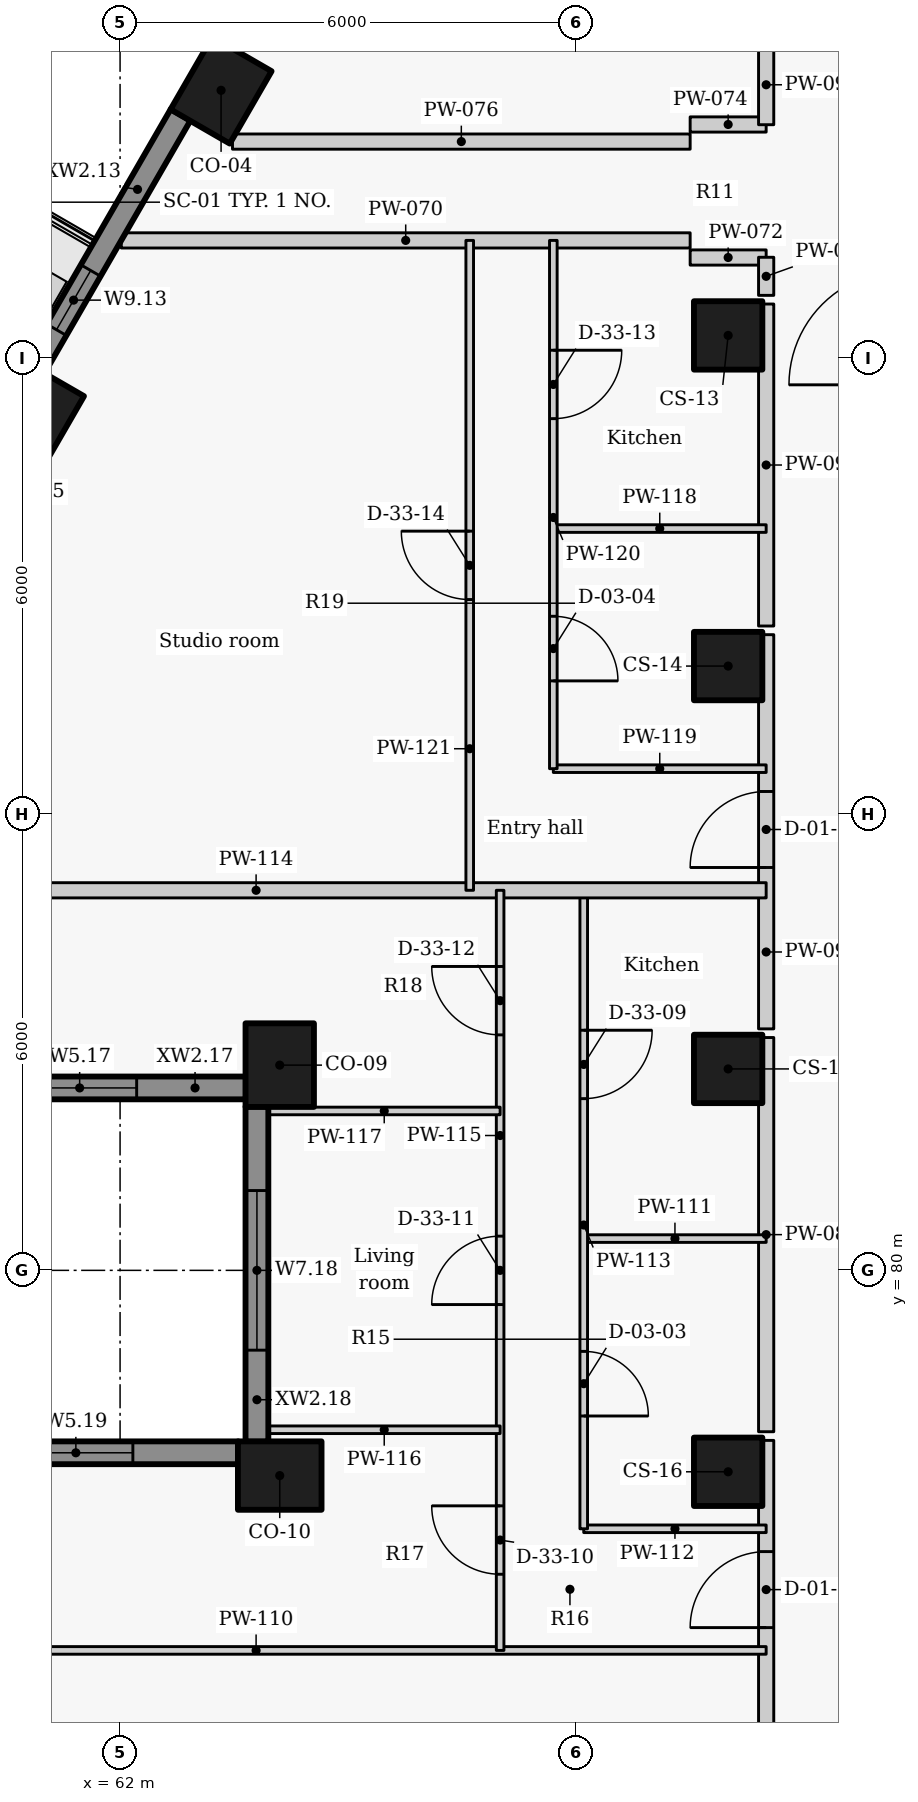
"""IFC4 building model, lengths in metres.
Left out: names, types, materials, properties, quantities, classifications, styles, units other than length and angle.
Written with IfcOpenShell. Run it as: python <this file> out.ifc"""

import sys

from ifc_helpers import new_model, si_unit, direction, frame, frame_2d, origin, origin_2d, place, context, subcontext, project, spatial, rectangle, extrude, element, fill, save


model = new_model("IFC4")
c1 = context("Model", 3, precision=1e-05, world=origin(), true_north=direction((0.0, 1.0)))
c2 = subcontext(c1, "Body", "Model", "MODEL_VIEW")
j1 = project(units=[si_unit("LENGTHUNIT", "METRE"), si_unit("PLANEANGLEUNIT", "RADIAN")], contexts=[c1])
p1 = place(None, origin())
s1 = spatial("IfcSite", under=j1, at=p1, CompositionType="ELEMENT")
p2 = place(p1, origin())
s2 = spatial("IfcBuilding", under=s1, at=p2, CompositionType="ELEMENT")
p3 = place(p2, frame((0.0, 0.0, 269.1)))
s3 = spatial("IfcBuildingStorey", under=s2, at=p3, CompositionType="ELEMENT", Elevation=269.1)
for number, where, z_axis, x_axis in (
    (1, (63.329, 95.525, 0.0), (0.0, 0.0, 1.0), (-0.5, -0.866, 0.0)),
    (2, (60.861, 91.25, 0.0), (0.0, 0.0, 1.0), (-0.5, -0.866, 0.0)),
    (3, (64.101, 82.7, 0.0), (0.0, 0.0, 1.0), (0.0, -1.0, 0.0)),
    (4, (64.101, 77.3, 0.0), (0.0, 0.0, 1.0), (-1.0, 0.0, 0.0)),
):
    element("IfcColumn", number, at=place(p3, frame(where, z_axis=z_axis, x_axis=x_axis)), inside=s3, PredefinedType="COLUMN", context=c2, shape_type="SweptSolid", body=[
        extrude(rectangle(XDim=1.1, YDim=0.9, at=origin_2d()), origin(), (0.0, 0.0, 1.0), 3.3),
    ])
for number, where, z_axis, x_axis in (
    (5, (70.0, 92.3, 0.0), (0.0, 0.0, 1.0), (0.0, -1.0, 0.0)),
    (6, (70.0, 87.95, 0.0), (0.0, 0.0, 1.0), (0.0, -1.0, 0.0)),
    (7, (70.0, 82.65, 0.0), (0.0, 0.0, 1.0), (0.0, -1.0, 0.0)),
    (8, (70.0, 77.35, 0.0), (0.0, 0.0, 1.0), (0.0, -1.0, 0.0)),
):
    element("IfcColumn", number, at=place(p3, frame(where, z_axis=z_axis, x_axis=x_axis)), inside=s3, PredefinedType="COLUMN", context=c2, shape_type="SweptSolid", body=[
        extrude(rectangle(XDim=0.9, YDim=0.9, at=origin_2d()), origin(), (0.0, 0.0, 1.0), 3.3),
    ])
p4 = place(p3, frame((62.796, 95.202, 0.0), z_axis=(0.0, 0.0, 1.0), x_axis=(-0.499984490703, -0.866034357896, 0.0)))
e9 = element("IfcWall", 9, at=p4, inside=s3, PredefinedType="SOLIDWALL", context=c2, shape_type="SweptSolid", body=[
    extrude(rectangle(XDim=3.844, YDim=0.3, at=frame_2d((1.922, 0.0))), origin(), (0.0, 0.0, 1.0), 2.125),
])
p5 = place(p4, frame((2.365, 0.0, 0.9)))
e10 = element("IfcOpeningElement", 10, at=p5, cuts=e9, PredefinedType="OPENING", context=c2, shape_type="SweptSolid", body=[
    extrude(rectangle(XDim=0.9, YDim=1.1, at=frame_2d((0.45, 0.55))), frame((0.0, 0.16, 0.0), z_axis=(0.0, -1.0, 0.0), x_axis=(1.0, 0.0, 0.0)), (0.0, 0.0, 1.0), 0.32),
])
p6 = place(p3, frame((59.282, 82.4, 0.0), z_axis=(0.0, 0.0, 1.0), x_axis=(1.0, 0.0, 0.0)))
e11 = element("IfcWall", 11, at=p6, inside=s3, PredefinedType="SOLIDWALL", context=c2, shape_type="SweptSolid", body=[
    extrude(rectangle(XDim=4.373, YDim=0.3, at=frame_2d((2.186, 0.0))), origin(), (0.0, 0.0, 1.0), 2.125),
])
p7 = place(p6, frame((1.436, 0.0, 0.9)))
e12 = element("IfcOpeningElement", 12, at=p7, cuts=e11, PredefinedType="OPENING", context=c2, shape_type="SweptSolid", body=[
    extrude(rectangle(XDim=1.5, YDim=1.1, at=frame_2d((0.75, 0.55))), frame((0.0, 0.16, 0.0), z_axis=(0.0, -1.0, 0.0), x_axis=(1.0, 0.0, 0.0)), (0.0, 0.0, 1.0), 0.32),
])
p8 = place(p3, frame((63.801, 82.154, 0.0), z_axis=(0.0, 0.0, 1.0), x_axis=(0.0, -1.0, 0.0)))
e13 = element("IfcWall", 13, at=p8, inside=s3, PredefinedType="SOLIDWALL", context=c2, shape_type="SweptSolid", body=[
    extrude(rectangle(XDim=4.408, YDim=0.3, at=frame_2d((2.204, 0.0))), origin(), (0.0, 0.0, 1.0), 2.125),
])
p9 = place(p8, frame((1.104, 0.0, 0.9)))
e14 = element("IfcOpeningElement", 14, at=p9, cuts=e13, PredefinedType="OPENING", context=c2, shape_type="SweptSolid", body=[
    extrude(rectangle(XDim=2.1, YDim=1.1, at=frame_2d((1.05, 0.55))), frame((0.0, 0.16, 0.0), z_axis=(0.0, -1.0, 0.0), x_axis=(1.0, 0.0, 0.0)), (0.0, 0.0, 1.0), 0.32),
])
p10 = place(p3, frame((63.554, 77.6, 0.0), z_axis=(0.0, 0.0, 1.0), x_axis=(-1.0, 0.0, 0.0)))
e15 = element("IfcWall", 15, at=p10, inside=s3, PredefinedType="SOLIDWALL", context=c2, shape_type="SweptSolid", body=[
    extrude(rectangle(XDim=4.272, YDim=0.3, at=frame_2d((2.136, 0.0))), origin(), (0.0, 0.0, 1.0), 2.125),
])
p11 = place(p10, frame((1.386, 0.0, 0.9)))
e16 = element("IfcOpeningElement", 16, at=p11, cuts=e15, PredefinedType="OPENING", context=c2, shape_type="SweptSolid", body=[
    extrude(rectangle(XDim=1.5, YDim=1.1, at=frame_2d((0.75, 0.55))), frame((0.0, 0.16, 0.0), z_axis=(0.0, -1.0, 0.0), x_axis=(1.0, 0.0, 0.0)), (0.0, 0.0, 1.0), 0.32),
])
p12 = place(p3, frame((62.015, 93.55, 0.0), z_axis=(0.0, 0.0, 1.0), x_axis=(1.0, 0.0, 0.0)))
e17 = element("IfcWall", 17, at=p12, inside=s3, PredefinedType="PARTITIONING", context=c2, shape_type="SweptSolid", body=[
    extrude(rectangle(XDim=7.485, YDim=0.2, at=frame_2d((3.742, 0.0))), origin(), (0.0, 0.0, 1.0), 2.105),
])
for number, where, z_axis, x_axis in (
    (18, (69.5, 93.325, 0.0), (0.0, 0.0, 1.0), (1.0, 0.0, 0.0)),
    (19, (69.5, 95.075, 0.0), (0.0, 0.0, 1.0), (1.0, 0.0, 0.0)),
):
    element("IfcWall", number, at=place(p3, frame(where, z_axis=z_axis, x_axis=x_axis)), inside=s3, PredefinedType="PARTITIONING", context=c2, shape_type="SweptSolid", body=[
        extrude(rectangle(XDim=1.0, YDim=0.2, at=frame_2d((0.5, 0.0))), origin(), (0.0, 0.0, 1.0), 2.505),
    ])
p13 = place(p3, frame((63.479, 94.85, 0.0), z_axis=(0.0, 0.0, 1.0), x_axis=(1.0, 0.0, 0.0)))
e20 = element("IfcWall", 20, at=p13, inside=s3, PredefinedType="PARTITIONING", context=c2, shape_type="SweptSolid", body=[
    extrude(rectangle(XDim=6.021, YDim=0.2, at=frame_2d((3.01, 0.0))), origin(), (0.0, 0.0, 1.0), 3.025),
])
p14 = place(p3, frame((70.5, 72.577, 0.0), z_axis=(0.0, 0.0, 1.0), x_axis=(0.0, 1.0, 0.0)))
e21 = element("IfcWall", 21, at=p14, inside=s3, PredefinedType="PARTITIONING", context=c2, shape_type="SweptSolid", body=[
    extrude(rectangle(XDim=5.186, YDim=0.2, at=frame_2d((2.593, 0.0))), origin(), (0.0, 0.0, 1.0), 3.025),
])
p15 = place(p14, frame((2.723, 0.0, 0.0)))
e22 = element("IfcOpeningElement", 22, at=p15, cuts=e21, PredefinedType="OPENING", context=c2, shape_type="SweptSolid", body=[
    extrude(rectangle(XDim=1.0, YDim=2.1, at=frame_2d((0.5, 1.05))), frame((0.0, 0.11, 0.0), z_axis=(0.0, -1.0, 0.0), x_axis=(1.0, 0.0, 0.0)), (0.0, 0.0, 1.0), 0.22),
])
p16 = place(p3, frame((70.5, 77.877, 0.0), z_axis=(0.0, 0.0, 1.0), x_axis=(0.0, 1.0, 0.0)))
e23 = element("IfcWall", 23, at=p16, inside=s3, PredefinedType="PARTITIONING", context=c2, shape_type="SweptSolid", body=[
    extrude(rectangle(XDim=5.186, YDim=0.2, at=frame_2d((2.593, 0.0))), origin(), (0.0, 0.0, 1.0), 3.025),
])
p17 = place(p3, frame((70.5, 83.177, 0.0), z_axis=(0.0, 0.0, 1.0), x_axis=(0.0, 1.0, 0.0)))
e24 = element("IfcWall", 24, at=p17, inside=s3, PredefinedType="PARTITIONING", context=c2, shape_type="SweptSolid", body=[
    extrude(rectangle(XDim=5.186, YDim=0.2, at=frame_2d((2.593, 0.0))), origin(), (0.0, 0.0, 1.0), 3.025),
])
p18 = place(p17, frame((2.123, 0.0, 0.0)))
e25 = element("IfcOpeningElement", 25, at=p18, cuts=e24, PredefinedType="OPENING", context=c2, shape_type="SweptSolid", body=[
    extrude(rectangle(XDim=1.0, YDim=2.1, at=frame_2d((0.5, 1.05))), frame((0.0, 0.11, 0.0), z_axis=(0.0, -1.0, 0.0), x_axis=(1.0, 0.0, 0.0)), (0.0, 0.0, 1.0), 0.22),
])
p19 = place(p3, frame((70.5, 88.477, 0.0), z_axis=(0.0, 0.0, 1.0), x_axis=(0.0, 1.0, 0.0)))
e26 = element("IfcWall", 26, at=p19, inside=s3, PredefinedType="PARTITIONING", context=c2, shape_type="SweptSolid", body=[
    extrude(rectangle(XDim=4.236, YDim=0.2, at=frame_2d((2.118, 0.0))), origin(), (0.0, 0.0, 1.0), 3.025),
])
p20 = place(p3, frame((70.5, 92.827, 0.0), z_axis=(0.0, 0.0, 1.0), x_axis=(0.0, 1.0, 0.0)))
e27 = element("IfcWall", 27, at=p20, inside=s3, PredefinedType="PARTITIONING", context=c2, shape_type="SweptSolid", body=[
    extrude(rectangle(XDim=0.501, YDim=0.2, at=frame_2d((0.25, 0.0))), origin(), (0.0, 0.0, 1.0), 3.025),
])
p21 = place(p3, frame((70.5, 95.072, 0.0), z_axis=(0.0, 0.0, 1.0), x_axis=(0.0, 1.0, 0.0)))
e28 = element("IfcWall", 28, at=p21, inside=s3, PredefinedType="PARTITIONING", context=c2, shape_type="SweptSolid", body=[
    extrude(rectangle(XDim=1.051, YDim=0.2, at=frame_2d((0.525, 0.0))), origin(), (0.0, 0.0, 1.0), 3.025),
])
p22 = place(p3, frame((57.079, 75.0, 0.0), z_axis=(0.0, 0.0, 1.0), x_axis=(1.0, 0.0, 0.0)))
e29 = element("IfcWall", 29, at=p22, inside=s3, PredefinedType="PARTITIONING", context=c2, shape_type="SweptSolid", body=[
    extrude(rectangle(XDim=13.421, YDim=0.1, at=frame_2d((6.71, 0.0))), origin(), (0.0, 0.0, 1.0), 2.105),
])
for number, where, z_axis, x_axis in (
    (30, (68.1, 80.418, 0.0), (0.0, 0.0, 1.0), (1.0, 0.0, 0.0)),
    (31, (68.1, 76.6, 0.0), (0.0, 0.0, 1.0), (1.0, 0.0, 0.0)),
):
    element("IfcWall", number, at=place(p3, frame(where, z_axis=z_axis, x_axis=x_axis)), inside=s3, PredefinedType="PARTITIONING", context=c2, shape_type="SweptSolid", body=[
        extrude(rectangle(XDim=2.4, YDim=0.1, at=frame_2d((1.2, 0.0))), origin(), (0.0, 0.0, 1.0), 2.505),
    ])
p23 = place(p3, frame((68.1, 85.0, 0.0), z_axis=(0.0, 0.0, 1.0), x_axis=(0.0, -1.0, 0.0)))
e32 = element("IfcWall", 32, at=p23, inside=s3, PredefinedType="PARTITIONING", context=c2, shape_type="SweptSolid", body=[
    extrude(rectangle(XDim=8.4, YDim=0.1, at=frame_2d((4.2, 0.0))), origin(), (0.0, 0.0, 1.0), 3.025),
])
p24 = place(p23, frame((6.066, 0.0, 0.0)))
e33 = element("IfcOpeningElement", 33, at=p24, cuts=e32, PredefinedType="OPENING", context=c2, shape_type="SweptSolid", body=[
    extrude(rectangle(XDim=0.85, YDim=2.1, at=frame_2d((0.425, 1.05))), frame((0.0, 0.06, 0.0), z_axis=(0.0, -1.0, 0.0), x_axis=(1.0, 0.0, 0.0)), (0.0, 0.0, 1.0), 0.12),
])
p25 = place(p23, frame((1.841, 0.0, 0.0)))
e34 = element("IfcOpeningElement", 34, at=p25, cuts=e32, PredefinedType="OPENING", context=c2, shape_type="SweptSolid", body=[
    extrude(rectangle(XDim=0.9, YDim=2.1, at=frame_2d((0.45, 1.05))), frame((0.0, 0.06, 0.0), z_axis=(0.0, -1.0, 0.0), x_axis=(1.0, 0.0, 0.0)), (0.0, 0.0, 1.0), 0.12),
])
p26 = place(p3, frame((57.079, 85.0, 0.0), z_axis=(0.0, 0.0, 1.0), x_axis=(1.0, 0.0, 0.0)))
e35 = element("IfcWall", 35, at=p26, inside=s3, PredefinedType="PARTITIONING", context=c2, shape_type="SweptSolid", body=[
    extrude(rectangle(XDim=13.421, YDim=0.2, at=frame_2d((6.71, 0.0))), origin(), (0.0, 0.0, 1.0), 2.105),
])
p27 = place(p3, frame((67.0, 75.0, 0.0), z_axis=(0.0, 0.0, 1.0), x_axis=(0.0, 1.0, 0.0)))
e36 = element("IfcWall", 36, at=p27, inside=s3, PredefinedType="PARTITIONING", context=c2, shape_type="SweptSolid", body=[
    extrude(rectangle(XDim=10.0, YDim=0.1, at=frame_2d((5.0, 0.0))), origin(), (0.0, 0.0, 1.0), 3.025),
])
p28 = place(p27, frame((1.002, 0.0, 0.0)))
e37 = element("IfcOpeningElement", 37, at=p28, cuts=e36, PredefinedType="OPENING", context=c2, shape_type="SweptSolid", body=[
    extrude(rectangle(XDim=0.9, YDim=2.1, at=frame_2d((0.45, 1.05))), frame((0.0, 0.06, 0.0), z_axis=(0.0, -1.0, 0.0), x_axis=(1.0, 0.0, 0.0)), (0.0, 0.0, 1.0), 0.12),
])
p29 = place(p27, frame((4.55, 0.0, 0.0)))
e38 = element("IfcOpeningElement", 38, at=p29, cuts=e36, PredefinedType="OPENING", context=c2, shape_type="SweptSolid", body=[
    extrude(rectangle(XDim=0.9, YDim=2.1, at=frame_2d((0.45, 1.05))), frame((0.0, 0.06, 0.0), z_axis=(0.0, -1.0, 0.0), x_axis=(1.0, 0.0, 0.0)), (0.0, 0.0, 1.0), 0.12),
])
p30 = place(p27, frame((8.098, 0.0, 0.0)))
e39 = element("IfcOpeningElement", 39, at=p30, cuts=e36, PredefinedType="OPENING", context=c2, shape_type="SweptSolid", body=[
    extrude(rectangle(XDim=0.9, YDim=2.1, at=frame_2d((0.45, 1.05))), frame((0.0, 0.06, 0.0), z_axis=(0.0, -1.0, 0.0), x_axis=(1.0, 0.0, 0.0)), (0.0, 0.0, 1.0), 0.12),
])
for number, where, z_axis, x_axis in (
    (40, (63.95, 77.903, 0.0), (0.0, 0.0, 1.0), (1.0, 0.0, 0.0)),
    (41, (63.95, 82.097, 0.0), (0.0, 0.0, 1.0), (1.0, 0.0, 0.0)),
):
    element("IfcWall", number, at=place(p3, frame(where, z_axis=z_axis, x_axis=x_axis)), inside=s3, PredefinedType="PARTITIONING", context=c2, shape_type="SweptSolid", body=[
        extrude(rectangle(XDim=3.05, YDim=0.1, at=frame_2d((1.525, 0.0))), origin(), (0.0, 0.0, 1.0), 2.105),
    ])
for number, where, z_axis, x_axis in (
    (42, (67.7, 89.759, 0.0), (0.0, 0.0, 1.0), (1.0, 0.0, 0.0)),
    (43, (67.7, 86.6, 0.0), (0.0, 0.0, 1.0), (1.0, 0.0, 0.0)),
):
    element("IfcWall", number, at=place(p3, frame(where, z_axis=z_axis, x_axis=x_axis)), inside=s3, PredefinedType="PARTITIONING", context=c2, shape_type="SweptSolid", body=[
        extrude(rectangle(XDim=2.8, YDim=0.1, at=frame_2d((1.4, 0.0))), origin(), (0.0, 0.0, 1.0), 2.505),
    ])
p31 = place(p3, frame((67.7, 93.55, 0.0), z_axis=(0.0, 0.0, 1.0), x_axis=(0.0, -1.0, 0.0)))
e44 = element("IfcWall", 44, at=p31, inside=s3, PredefinedType="PARTITIONING", context=c2, shape_type="SweptSolid", body=[
    extrude(rectangle(XDim=6.95, YDim=0.1, at=frame_2d((3.475, 0.0))), origin(), (0.0, 0.0, 1.0), 3.025),
])
p32 = place(p31, frame((4.945, 0.0, 0.0)))
e45 = element("IfcOpeningElement", 45, at=p32, cuts=e44, PredefinedType="OPENING", context=c2, shape_type="SweptSolid", body=[
    extrude(rectangle(XDim=0.85, YDim=2.1, at=frame_2d((0.425, 1.05))), frame((0.0, 0.06, 0.0), z_axis=(0.0, -1.0, 0.0), x_axis=(1.0, 0.0, 0.0)), (0.0, 0.0, 1.0), 0.12),
])
p33 = place(p31, frame((1.445, 0.0, 0.0)))
e46 = element("IfcOpeningElement", 46, at=p33, cuts=e44, PredefinedType="OPENING", context=c2, shape_type="SweptSolid", body=[
    extrude(rectangle(XDim=0.9, YDim=2.1, at=frame_2d((0.45, 1.05))), frame((0.0, 0.06, 0.0), z_axis=(0.0, -1.0, 0.0), x_axis=(1.0, 0.0, 0.0)), (0.0, 0.0, 1.0), 0.12),
])
p34 = place(p3, frame((66.6, 85.0, 0.0), z_axis=(0.0, 0.0, 1.0), x_axis=(0.0, 1.0, 0.0)))
e47 = element("IfcWall", 47, at=p34, inside=s3, PredefinedType="PARTITIONING", context=c2, shape_type="SweptSolid", body=[
    extrude(rectangle(XDim=8.55, YDim=0.1, at=frame_2d((4.275, 0.0))), origin(), (0.0, 0.0, 1.0), 3.025),
])
p35 = place(p34, frame((3.825, 0.0, 0.0)))
e48 = element("IfcOpeningElement", 48, at=p35, cuts=e47, PredefinedType="OPENING", context=c2, shape_type="SweptSolid", body=[
    extrude(rectangle(XDim=0.9, YDim=2.1, at=frame_2d((0.45, 1.05))), frame((0.0, 0.06, 0.0), z_axis=(0.0, -1.0, 0.0), x_axis=(1.0, 0.0, 0.0)), (0.0, 0.0, 1.0), 0.12),
])
p36 = place(p5, origin())
e49 = element("IfcWindow", 49, at=p36, inside=s3, PartitioningType="SINGLE_PANEL", PredefinedType="WINDOW", context=c2, shape_type="SweptSolid", body=[
    extrude(rectangle(XDim=0.9, YDim=1.1, at=frame_2d((0.45, 0.55))), frame((0.0, 0.03, 0.0), z_axis=(0.0, -1.0, 0.0), x_axis=(1.0, 0.0, 0.0)), (0.0, 0.0, 1.0), 0.06),
])
fill(e10, e49)
p37 = place(p7, origin())
e50 = element("IfcWindow", 50, at=p37, inside=s3, PartitioningType="SINGLE_PANEL", PredefinedType="WINDOW", context=c2, shape_type="SweptSolid", body=[
    extrude(rectangle(XDim=1.5, YDim=1.1, at=frame_2d((0.75, 0.55))), frame((0.0, 0.03, 0.0), z_axis=(0.0, -1.0, 0.0), x_axis=(1.0, 0.0, 0.0)), (0.0, 0.0, 1.0), 0.06),
])
fill(e12, e50)
p38 = place(p9, origin())
e51 = element("IfcWindow", 51, at=p38, inside=s3, PartitioningType="SINGLE_PANEL", PredefinedType="WINDOW", context=c2, shape_type="SweptSolid", body=[
    extrude(rectangle(XDim=2.1, YDim=1.1, at=frame_2d((1.05, 0.55))), frame((0.0, 0.03, 0.0), z_axis=(0.0, -1.0, 0.0), x_axis=(1.0, 0.0, 0.0)), (0.0, 0.0, 1.0), 0.06),
])
fill(e14, e51)
p39 = place(p11, origin())
e52 = element("IfcWindow", 52, at=p39, inside=s3, PartitioningType="SINGLE_PANEL", PredefinedType="WINDOW", context=c2, shape_type="SweptSolid", body=[
    extrude(rectangle(XDim=1.5, YDim=1.1, at=frame_2d((0.75, 0.55))), frame((0.0, 0.03, 0.0), z_axis=(0.0, -1.0, 0.0), x_axis=(1.0, 0.0, 0.0)), (0.0, 0.0, 1.0), 0.06),
])
fill(e16, e52)
p40 = place(p15, origin())
e53 = element("IfcDoor", 53, at=p40, inside=s3, OperationType="SINGLE_SWING_LEFT", PredefinedType="DOOR", context=c2, shape_type="SweptSolid", body=[
    extrude(rectangle(XDim=1.0, YDim=2.1, at=frame_2d((0.5, 1.05))), frame((0.0, 0.025, 0.0), z_axis=(0.0, -1.0, 0.0), x_axis=(1.0, 0.0, 0.0)), (0.0, 0.0, 1.0), 0.05),
])
fill(e22, e53)
p41 = place(p24, origin())
e54 = element("IfcDoor", 54, at=p41, inside=s3, OperationType="SINGLE_SWING_RIGHT", PredefinedType="DOOR", context=c2, shape_type="SweptSolid", body=[
    extrude(rectangle(XDim=0.85, YDim=2.1, at=frame_2d((0.425, 1.05))), frame((0.0, 0.025, 0.0), z_axis=(0.0, -1.0, 0.0), x_axis=(1.0, 0.0, 0.0)), (0.0, 0.0, 1.0), 0.05),
])
fill(e33, e54)
p42 = place(p25, origin())
e55 = element("IfcDoor", 55, at=p42, inside=s3, OperationType="SINGLE_SWING_LEFT", PredefinedType="DOOR", context=c2, shape_type="SweptSolid", body=[
    extrude(rectangle(XDim=0.9, YDim=2.1, at=frame_2d((0.45, 1.05))), frame((0.0, 0.025, 0.0), z_axis=(0.0, -1.0, 0.0), x_axis=(1.0, 0.0, 0.0)), (0.0, 0.0, 1.0), 0.05),
])
fill(e34, e55)
p43 = place(p28, origin())
e56 = element("IfcDoor", 56, at=p43, inside=s3, OperationType="SINGLE_SWING_RIGHT", PredefinedType="DOOR", context=c2, shape_type="SweptSolid", body=[
    extrude(rectangle(XDim=0.9, YDim=2.1, at=frame_2d((0.45, 1.05))), frame((0.0, 0.025, 0.0), z_axis=(0.0, -1.0, 0.0), x_axis=(1.0, 0.0, 0.0)), (0.0, 0.0, 1.0), 0.05),
])
fill(e37, e56)
p44 = place(p29, origin())
e57 = element("IfcDoor", 57, at=p44, inside=s3, OperationType="SINGLE_SWING_LEFT", PredefinedType="DOOR", context=c2, shape_type="SweptSolid", body=[
    extrude(rectangle(XDim=0.9, YDim=2.1, at=frame_2d((0.45, 1.05))), frame((0.0, 0.025, 0.0), z_axis=(0.0, -1.0, 0.0), x_axis=(1.0, 0.0, 0.0)), (0.0, 0.0, 1.0), 0.05),
])
fill(e38, e57)
p45 = place(p30, origin())
e58 = element("IfcDoor", 58, at=p45, inside=s3, OperationType="SINGLE_SWING_RIGHT", PredefinedType="DOOR", context=c2, shape_type="SweptSolid", body=[
    extrude(rectangle(XDim=0.9, YDim=2.1, at=frame_2d((0.45, 1.05))), frame((0.0, 0.025, 0.0), z_axis=(0.0, -1.0, 0.0), x_axis=(1.0, 0.0, 0.0)), (0.0, 0.0, 1.0), 0.05),
])
fill(e39, e58)
p46 = place(p18, origin())
e59 = element("IfcDoor", 59, at=p46, inside=s3, OperationType="SINGLE_SWING_LEFT", PredefinedType="DOOR", context=c2, shape_type="SweptSolid", body=[
    extrude(rectangle(XDim=1.0, YDim=2.1, at=frame_2d((0.5, 1.05))), frame((0.0, 0.025, 0.0), z_axis=(0.0, -1.0, 0.0), x_axis=(1.0, 0.0, 0.0)), (0.0, 0.0, 1.0), 0.05),
])
fill(e25, e59)
p47 = place(p32, origin())
e60 = element("IfcDoor", 60, at=p47, inside=s3, OperationType="SINGLE_SWING_RIGHT", PredefinedType="DOOR", context=c2, shape_type="SweptSolid", body=[
    extrude(rectangle(XDim=0.85, YDim=2.1, at=frame_2d((0.425, 1.05))), frame((0.0, 0.025, 0.0), z_axis=(0.0, -1.0, 0.0), x_axis=(1.0, 0.0, 0.0)), (0.0, 0.0, 1.0), 0.05),
])
fill(e45, e60)
p48 = place(p33, origin())
e61 = element("IfcDoor", 61, at=p48, inside=s3, OperationType="SINGLE_SWING_LEFT", PredefinedType="DOOR", context=c2, shape_type="SweptSolid", body=[
    extrude(rectangle(XDim=0.9, YDim=2.1, at=frame_2d((0.45, 1.05))), frame((0.0, 0.025, 0.0), z_axis=(0.0, -1.0, 0.0), x_axis=(1.0, 0.0, 0.0)), (0.0, 0.0, 1.0), 0.05),
])
fill(e46, e61)
p49 = place(p35, origin())
e62 = element("IfcDoor", 62, at=p49, inside=s3, OperationType="SINGLE_SWING_RIGHT", PredefinedType="DOOR", context=c2, shape_type="SweptSolid", body=[
    extrude(rectangle(XDim=0.9, YDim=2.1, at=frame_2d((0.45, 1.05))), frame((0.0, 0.025, 0.0), z_axis=(0.0, -1.0, 0.0), x_axis=(1.0, 0.0, 0.0)), (0.0, 0.0, 1.0), 0.05),
])
fill(e48, e62)
save(model, sys.argv[1])
